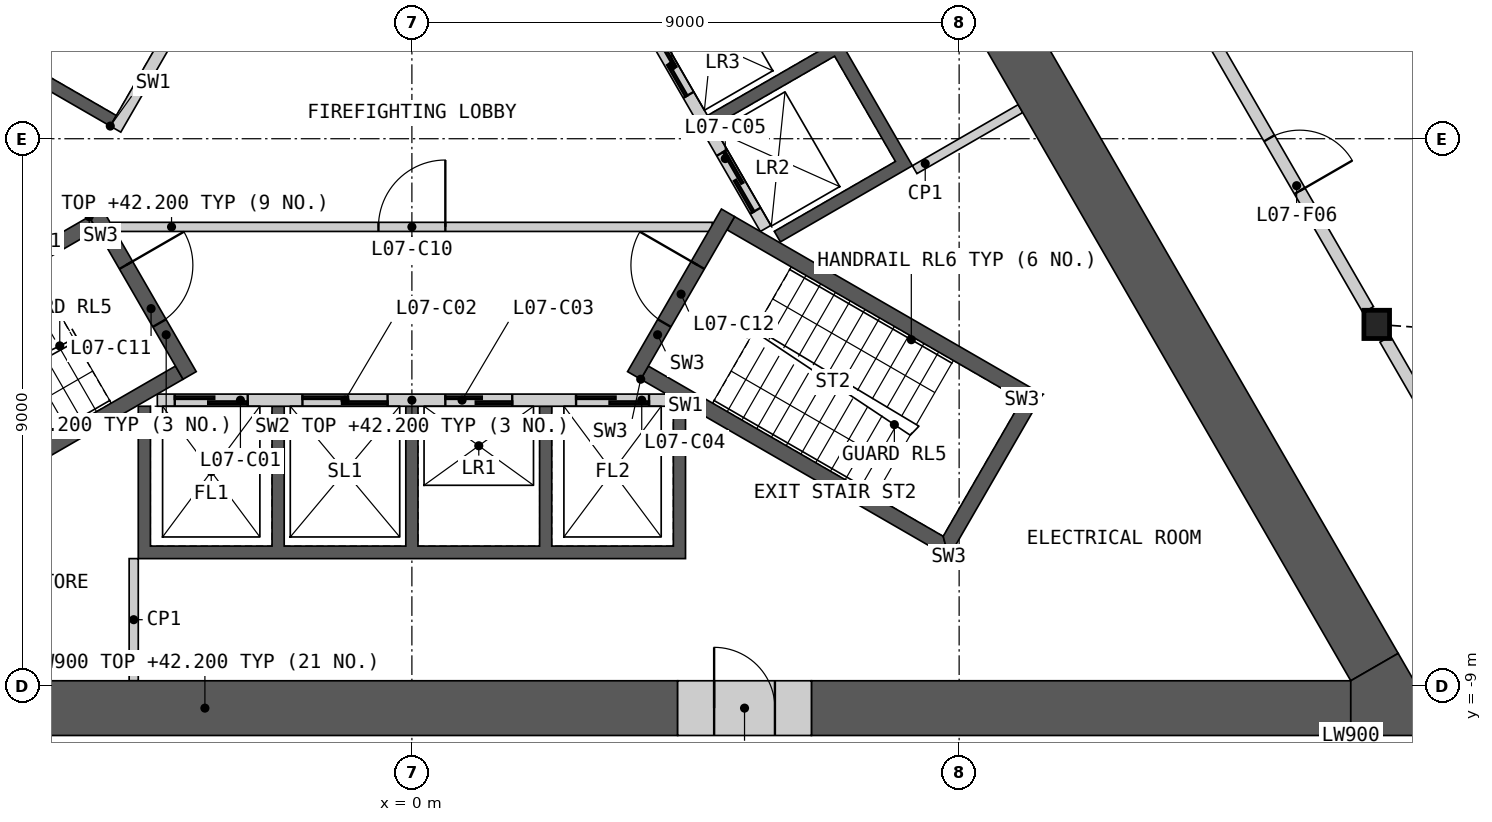
"""IFC4 building model, lengths in metres.
Left out: names, types, materials, properties, quantities, classifications, styles, units other than length and angle.
Written with IfcOpenShell. Run it as: python <this file> out.ifc"""

import sys

from ifc_helpers import new_model, si_unit, direction, frame, frame_2d, origin, origin_2d, place, context, subcontext, project, spatial, polyline, rectangle, i_section, outline, extrude, element, fill, save


model = new_model("IFC4")
c1 = context("Model", 3, precision=1e-05, world=origin(), true_north=direction((0.0, 1.0)))
c2 = subcontext(c1, "Body", "Model", "MODEL_VIEW")
j1 = project(units=[si_unit("LENGTHUNIT", "METRE"), si_unit("PLANEANGLEUNIT", "RADIAN")], contexts=[c1])
p1 = place(None, origin())
s1 = spatial("IfcSite", under=j1, at=p1, CompositionType="ELEMENT")
p2 = place(p1, origin())
s2 = spatial("IfcBuilding", under=s1, at=p2, CompositionType="ELEMENT")
p3 = place(p2, frame((0.0, 0.0, 38.4)))
s3 = spatial("IfcBuildingStorey", under=s2, at=p3, CompositionType="ELEMENT", Elevation=38.4)
p4 = place(p3, frame((15.868, -3.054, 0.0), z_axis=(0.0, 0.0, 1.0), x_axis=(1.0, 0.0, 0.0)))
e1 = element("IfcColumn", 1, at=p4, inside=s3, PredefinedType="COLUMN", context=c2, shape_type="SweptSolid", body=[
    extrude(i_section(OverallWidth=0.421, OverallDepth=0.465, WebThickness=0.045, FlangeThickness=0.072, at=origin_2d()), origin(), (0.0, 0.0, 1.0), 4.2),
])
p5 = place(p3, origin())
e2 = element("IfcWall", 2, at=p5, inside=s3, PredefinedType="SHEAR", context=c2, shape_type="SweptSolid", body=[
    extrude(outline(polyline([(4.5, -4.4), (4.5, -6.906), (-4.5, -6.906), (-4.5, -4.4), (-4.3, -4.4), (-4.3, -6.7), (-2.3, -6.7), (-2.3, -4.4), (-2.1, -4.4), (-2.1, -6.7), (-0.1, -6.7), (-0.1, -4.4), (0.1, -4.4), (0.1, -6.7), (2.1, -6.7), (2.1, -4.4), (2.3, -4.4), (2.3, -6.7), (4.3, -6.7), (4.3, -4.4), (4.5, -4.4)])), origin(), (0.0, 0.0, 1.0), 3.8),
])
p6 = place(p3, frame((-4.187, -4.3, 0.0), z_axis=(0.0, 0.0, 1.0), x_axis=(1.0, 0.0, 0.0)))
e3 = element("IfcWall", 3, at=p6, inside=s3, PredefinedType="SOLIDWALL", context=c2, shape_type="SweptSolid", body=[
    extrude(rectangle(XDim=8.373, YDim=0.2, at=frame_2d((4.187, 0.0))), origin(), (0.0, 0.0, 1.0), 3.8),
])
p7 = place(p6, frame((0.287, 0.0, 0.0)))
e4 = element("IfcOpeningElement", 4, at=p7, cuts=e3, PredefinedType="OPENING", context=c2, shape_type="SweptSolid", body=[
    extrude(rectangle(XDim=1.2, YDim=2.1, at=frame_2d((0.6, 1.05))), frame((0.0, 0.11, 0.0), z_axis=(0.0, -1.0, 0.0), x_axis=(1.0, 0.0, 0.0)), (0.0, 0.0, 1.0), 0.22),
])
p8 = place(p6, frame((2.387, 0.0, 0.0)))
e5 = element("IfcOpeningElement", 5, at=p8, cuts=e3, PredefinedType="OPENING", context=c2, shape_type="SweptSolid", body=[
    extrude(rectangle(XDim=1.4, YDim=2.1, at=frame_2d((0.7, 1.05))), frame((0.0, 0.11, 0.0), z_axis=(0.0, -1.0, 0.0), x_axis=(1.0, 0.0, 0.0)), (0.0, 0.0, 1.0), 0.22),
])
p9 = place(p6, frame((4.737, 0.0, 0.0)))
e6 = element("IfcOpeningElement", 6, at=p9, cuts=e3, PredefinedType="OPENING", context=c2, shape_type="SweptSolid", body=[
    extrude(rectangle(XDim=1.1, YDim=2.1, at=frame_2d((0.55, 1.05))), frame((0.0, 0.11, 0.0), z_axis=(0.0, -1.0, 0.0), x_axis=(1.0, 0.0, 0.0)), (0.0, 0.0, 1.0), 0.22),
])
p10 = place(p6, frame((6.887, 0.0, 0.0)))
e7 = element("IfcOpeningElement", 7, at=p10, cuts=e3, PredefinedType="OPENING", context=c2, shape_type="SweptSolid", body=[
    extrude(rectangle(XDim=1.2, YDim=2.1, at=frame_2d((0.6, 1.05))), frame((0.0, 0.11, 0.0), z_axis=(0.0, -1.0, 0.0), x_axis=(1.0, 0.0, 0.0)), (0.0, 0.0, 1.0), 0.22),
])
p11 = place(p3, origin())
e8 = element("IfcWall", 8, at=p11, inside=s3, PredefinedType="SHEAR", context=c2, shape_type="SweptSolid", body=[
    extrude(outline(polyline([(2.66, 4.192), (4.831, 5.445), (8.231, -0.444), (6.061, -1.697), (5.96, -1.524), (7.952, -0.374), (6.952, 1.358), (4.96, 0.208), (4.861, 0.381), (6.852, 1.531), (5.852, 3.263), (3.861, 2.113), (3.76, 2.287), (5.752, 3.437), (4.752, 5.169), (2.76, 4.019), (2.66, 4.192)])), origin(), (0.0, 0.0, 1.0), 3.8),
])
p12 = place(p3, frame((5.817, -1.476, 0.0), z_axis=(0.0, 0.0, 1.0), x_axis=(-0.500002616675, 0.866023893041, 0.0)))
e9 = element("IfcWall", 9, at=p12, inside=s3, PredefinedType="SOLIDWALL", context=c2, shape_type="SweptSolid", body=[
    extrude(rectangle(XDim=8.373, YDim=0.2, at=frame_2d((4.187, 0.0))), origin(), (0.0, 0.0, 1.0), 3.8),
])
p13 = place(p12, frame((0.337, 0.0, 0.0)))
e10 = element("IfcOpeningElement", 10, at=p13, cuts=e9, PredefinedType="OPENING", context=c2, shape_type="SweptSolid", body=[
    extrude(rectangle(XDim=1.1, YDim=2.1, at=frame_2d((0.55, 1.05))), frame((0.0, 0.11, 0.0), z_axis=(0.0, -1.0, 0.0), x_axis=(1.0, 0.0, 0.0)), (0.0, 0.0, 1.0), 0.22),
])
p14 = place(p12, frame((2.537, 0.0, 0.0)))
e11 = element("IfcOpeningElement", 11, at=p14, cuts=e9, PredefinedType="OPENING", context=c2, shape_type="SweptSolid", body=[
    extrude(rectangle(XDim=1.1, YDim=2.1, at=frame_2d((0.55, 1.05))), frame((0.0, 0.11, 0.0), z_axis=(0.0, -1.0, 0.0), x_axis=(1.0, 0.0, 0.0)), (0.0, 0.0, 1.0), 0.22),
])
p15 = place(p12, frame((4.737, 0.0, 0.0)))
e12 = element("IfcOpeningElement", 12, at=p15, cuts=e9, PredefinedType="OPENING", context=c2, shape_type="SweptSolid", body=[
    extrude(rectangle(XDim=1.1, YDim=2.1, at=frame_2d((0.55, 1.05))), frame((0.0, 0.11, 0.0), z_axis=(0.0, -1.0, 0.0), x_axis=(1.0, 0.0, 0.0)), (0.0, 0.0, 1.0), 0.22),
])
p16 = place(p12, frame((7.037, 0.0, 0.0)))
e13 = element("IfcOpeningElement", 13, at=p16, cuts=e9, PredefinedType="OPENING", context=c2, shape_type="SweptSolid", body=[
    extrude(rectangle(XDim=0.9, YDim=2.1, at=frame_2d((0.45, 1.05))), frame((0.0, 0.11, 0.0), z_axis=(0.0, -1.0, 0.0), x_axis=(1.0, 0.0, 0.0)), (0.0, 0.0, 1.0), 0.22),
])
p17 = place(p3, origin())
e14 = element("IfcWall", 14, at=p17, inside=s3, PredefinedType="SHEAR", context=c2, shape_type="SweptSolid", body=[
    extrude(outline(polyline([(-4.96, 0.208), (-7.131, 1.461), (-3.731, 7.35), (-1.561, 6.097), (-1.66, 5.924), (-3.652, 7.074), (-5.752, 3.437), (-3.76, 2.287), (-3.861, 2.113), (-5.852, 3.263), (-6.852, 1.531), (-4.861, 0.381), (-4.96, 0.208)])), origin(), (0.0, 0.0, 1.0), 3.8),
])
p18 = place(p3, frame((-1.631, 5.776, 0.0), z_axis=(0.0, 0.0, 1.0), x_axis=(-0.499992876559, -0.866029516466, 0.0)))
e15 = element("IfcWall", 15, at=p18, inside=s3, PredefinedType="SOLIDWALL", context=c2, shape_type="SweptSolid", body=[
    extrude(rectangle(XDim=6.486, YDim=0.2, at=frame_2d((3.243, 0.0))), origin(), (0.0, 0.0, 1.0), 3.8),
])
p19 = place(p18, frame((1.537, 0.0, 0.0)))
e16 = element("IfcOpeningElement", 16, at=p19, cuts=e15, PredefinedType="OPENING", context=c2, shape_type="SweptSolid", body=[
    extrude(rectangle(XDim=0.9, YDim=2.1, at=frame_2d((0.45, 1.05))), frame((0.0, 0.11, 0.0), z_axis=(0.0, -1.0, 0.0), x_axis=(1.0, 0.0, 0.0)), (0.0, 0.0, 1.0), 0.22),
])
p20 = place(p3, frame((-4.941, -1.45, 0.0), z_axis=(0.0, 0.0, 1.0), x_axis=(1.0, 0.0, 0.0)))
e17 = element("IfcWall", 17, at=p20, inside=s3, PredefinedType="PARTITIONING", context=c2, shape_type="SweptSolid", body=[
    extrude(rectangle(XDim=9.882, YDim=0.15, at=frame_2d((4.941, 0.0))), origin(), (0.0, 0.0, 1.0), 3.8),
])
p21 = place(p20, frame((4.391, 0.0, 0.0)))
e18 = element("IfcOpeningElement", 18, at=p21, cuts=e17, PredefinedType="OPENING", context=c2, shape_type="SweptSolid", body=[
    extrude(rectangle(XDim=1.1, YDim=2.1, at=frame_2d((0.55, 1.05))), frame((0.0, 0.085, 0.0), z_axis=(0.0, -1.0, 0.0), x_axis=(1.0, 0.0, 0.0)), (0.0, 0.0, 1.0), 0.17),
])
p22 = place(p3, origin())
e19 = element("IfcWall", 19, at=p22, inside=s3, PredefinedType="SHEAR", context=c2, shape_type="SweptSolid", body=[
    extrude(outline(polyline([(-5.307, -1.281), (-10.374, -4.206), (-10.032, -4.298), (-5.182, -1.498), (-5.307, -1.281)])), origin(), (0.0, 0.0, 1.0), 3.8),
])
p23 = place(p3, origin())
e20 = element("IfcWall", 20, at=p23, inside=s3, PredefinedType="SHEAR", context=c2, shape_type="SweptSolid", body=[
    extrude(outline(polyline([(-8.738, -6.539), (-8.83, -6.881), (-3.763, -3.956), (-3.888, -3.739), (-8.738, -6.539)])), origin(), (0.0, 0.0, 1.0), 3.8),
])
p24 = place(p3, frame((-5.199, -1.219, 0.0), z_axis=(0.0, 0.0, 1.0), x_axis=(0.499982516597, -0.866035497597, 0.0)))
e21 = element("IfcWall", 21, at=p24, inside=s3, PredefinedType="SHEAR", context=c2, shape_type="SweptSolid", body=[
    extrude(rectangle(XDim=3.088, YDim=0.25, at=frame_2d((1.544, 0.0))), origin(), (0.0, 0.0, 1.0), 3.8),
])
p25 = place(p24, frame((0.994, 0.0, 0.0)))
e22 = element("IfcOpeningElement", 22, at=p25, cuts=e21, PredefinedType="OPENING", context=c2, shape_type="SweptSolid", body=[
    extrude(rectangle(XDim=1.1, YDim=2.1, at=frame_2d((0.55, 1.05))), frame((0.0, 0.135, 0.0), z_axis=(0.0, -1.0, 0.0), x_axis=(1.0, 0.0, 0.0)), (0.0, 0.0, 1.0), 0.27),
])
p26 = place(p3, origin())
e23 = element("IfcWall", 23, at=p26, inside=s3, PredefinedType="SHEAR", context=c2, shape_type="SweptSolid", body=[
    extrude(outline(polyline([(3.763, -3.956), (8.83, -6.881), (8.738, -6.539), (3.888, -3.739), (3.763, -3.956)])), origin(), (0.0, 0.0, 1.0), 3.8),
])
p27 = place(p3, origin())
e24 = element("IfcWall", 24, at=p27, inside=s3, PredefinedType="SHEAR", context=c2, shape_type="SweptSolid", body=[
    extrude(outline(polyline([(8.83, -6.881), (10.374, -4.206), (10.032, -4.298), (8.738, -6.539), (8.83, -6.881)])), origin(), (0.0, 0.0, 1.0), 3.8),
])
p28 = place(p3, origin())
e25 = element("IfcWall", 25, at=p28, inside=s3, PredefinedType="SHEAR", context=c2, shape_type="SweptSolid", body=[
    extrude(outline(polyline([(10.032, -4.298), (10.374, -4.206), (5.307, -1.281), (5.182, -1.498), (10.032, -4.298)])), origin(), (0.0, 0.0, 1.0), 3.8),
])
p29 = place(p3, frame((3.655, -3.893, 0.0), z_axis=(0.0, 0.0, 1.0), x_axis=(0.499982516597, 0.866035497597, 0.0)))
e26 = element("IfcWall", 26, at=p29, inside=s3, PredefinedType="SHEAR", context=c2, shape_type="SweptSolid", body=[
    extrude(rectangle(XDim=3.088, YDim=0.25, at=frame_2d((1.544, 0.0))), origin(), (0.0, 0.0, 1.0), 3.8),
])
p30 = place(p29, frame((0.994, 0.0, 0.0)))
e27 = element("IfcOpeningElement", 27, at=p30, cuts=e26, PredefinedType="OPENING", context=c2, shape_type="SweptSolid", body=[
    extrude(rectangle(XDim=1.1, YDim=2.1, at=frame_2d((0.55, 1.05))), frame((0.0, 0.135, 0.0), z_axis=(0.0, -1.0, 0.0), x_axis=(1.0, 0.0, 0.0)), (0.0, 0.0, 1.0), 0.27),
])
p31 = place(p3, frame((8.268, -0.509, 0.0), z_axis=(0.0, 0.0, 1.0), x_axis=(0.866035824272, 0.499981950752, 0.0)))
e28 = element("IfcWall", 28, at=p31, inside=s3, PredefinedType="PARTITIONING", context=c2, shape_type="SweptSolid", body=[
    extrude(rectangle(XDim=2.009, YDim=0.15, at=frame_2d((1.004, 0.0))), origin(), (0.0, 0.0, 1.0), 3.8),
])
p32 = place(p3, frame((-4.575, -6.906, 0.0), z_axis=(0.0, 0.0, 1.0), x_axis=(0.0, -1.0, 0.0)))
e29 = element("IfcWall", 29, at=p32, inside=s3, PredefinedType="PARTITIONING", context=c2, shape_type="SweptSolid", body=[
    extrude(rectangle(XDim=2.009, YDim=0.15, at=frame_2d((1.004, 0.0))), origin(), (0.0, 0.0, 1.0), 3.8),
])
p33 = place(p3, frame((-11.179, -9.365, 0.0), z_axis=(0.0, 0.0, 1.0), x_axis=(1.0, 0.0, 0.0)))
e30 = element("IfcWall", 30, at=p33, inside=s3, PredefinedType="SHEAR", context=c2, shape_type="SweptSolid", body=[
    extrude(rectangle(XDim=15.55, YDim=0.9, at=frame_2d((7.775, 0.0))), origin(), (0.0, 0.0, 1.0), 3.8),
])
p34 = place(p3, frame((6.571, -9.365, 0.0), z_axis=(0.0, 0.0, 1.0), x_axis=(1.0, 0.0, 0.0)))
e31 = element("IfcWall", 31, at=p34, inside=s3, PredefinedType="SHEAR", context=c2, shape_type="SweptSolid", body=[
    extrude(rectangle(XDim=8.871, YDim=0.9, at=frame_2d((4.435, 0.0))), origin(), (0.0, 0.0, 1.0), 3.8),
])
p35 = place(p3, frame((15.831, -8.69, 0.0), z_axis=(0.0, 0.0, 1.0), x_axis=(-0.499997452939, 0.866026874326, 0.0)))
e32 = element("IfcWall", 32, at=p35, inside=s3, PredefinedType="SHEAR", context=c2, shape_type="SweptSolid", body=[
    extrude(rectangle(XDim=13.141, YDim=0.9, at=frame_2d((6.571, 0.0))), origin(), (0.0, 0.0, 1.0), 3.8),
])
p36 = place(p3, origin())
e33 = element("IfcWall", 33, at=p36, inside=s3, PredefinedType="SHEAR", context=c2, shape_type="SweptSolid", body=[
    extrude(outline(polyline([(15.441, -9.815), (15.441, -8.915), (16.221, -8.465), (17.0, -9.815), (15.441, -9.815)])), origin(), (0.0, 0.0, 1.0), 3.8),
])
p37 = place(p3, frame((4.371, -9.365, 0.0), z_axis=(0.0, 0.0, 1.0), x_axis=(1.0, 0.0, 0.0)))
e34 = element("IfcWall", 34, at=p37, inside=s3, PredefinedType="SHEAR", context=c2, shape_type="SweptSolid", body=[
    extrude(rectangle(XDim=2.2, YDim=0.9, at=frame_2d((1.1, 0.0))), origin(), (0.0, 0.0, 1.0), 3.8),
])
p38 = place(p37, frame((0.6, 0.0, 0.0)))
e35 = element("IfcOpeningElement", 35, at=p38, cuts=e34, PredefinedType="OPENING", context=c2, shape_type="SweptSolid", body=[
    extrude(rectangle(XDim=1.0, YDim=2.1, at=frame_2d((0.5, 1.05))), frame((0.0, 0.46, 0.0), z_axis=(0.0, -1.0, 0.0), x_axis=(1.0, 0.0, 0.0)), (0.0, 0.0, 1.0), 0.92),
])
p39 = place(p3, frame((10.719, 5.865, 0.0), z_axis=(0.0, 0.0, 1.0), x_axis=(0.49999175339, -0.866030164915, 0.0)))
e36 = element("IfcWall", 36, at=p39, inside=s3, PredefinedType="PARTITIONING", context=c2, shape_type="SweptSolid", body=[
    extrude(rectangle(XDim=10.019, YDim=0.2, at=frame_2d((5.009, 0.0))), origin(), (0.0, 0.0, 1.0), 3.8),
])
p40 = place(p39, frame((6.764, 0.0, 0.0)))
e37 = element("IfcOpeningElement", 37, at=p40, cuts=e36, PredefinedType="OPENING", context=c2, shape_type="SweptSolid", body=[
    extrude(rectangle(XDim=1.0, YDim=2.1, at=frame_2d((0.5, 1.05))), frame((0.0, 0.11, 0.0), z_axis=(0.0, -1.0, 0.0), x_axis=(1.0, 0.0, 0.0)), (0.0, 0.0, 1.0), 0.22),
])
p41 = place(p3, frame((16.008, -3.296, 0.0), z_axis=(0.0, 0.0, 1.0), x_axis=(0.499984737558, -0.86603421538, 0.0)))
e38 = element("IfcWall", 38, at=p41, inside=s3, PredefinedType="PARTITIONING", context=c2, shape_type="SweptSolid", body=[
    extrude(rectangle(XDim=6.473, YDim=0.2, at=frame_2d((3.236, 0.0))), origin(), (0.0, 0.0, 1.0), 3.8),
])
p42 = place(p41, frame((4.512, 0.0, 0.0)))
e39 = element("IfcOpeningElement", 39, at=p42, cuts=e38, PredefinedType="OPENING", context=c2, shape_type="SweptSolid", body=[
    extrude(rectangle(XDim=1.0, YDim=2.1, at=frame_2d((0.5, 1.05))), frame((0.0, 0.11, 0.0), z_axis=(0.0, -1.0, 0.0), x_axis=(1.0, 0.0, 0.0)), (0.0, 0.0, 1.0), 0.22),
])
p43 = place(p7, origin())
e40 = element("IfcDoor", 40, at=p43, inside=s3, OperationType="SLIDING_TO_LEFT", PredefinedType="DOOR", context=c2, shape_type="SweptSolid", body=[
    extrude(rectangle(XDim=1.2, YDim=2.1, at=frame_2d((0.6, 1.05))), frame((0.0, 0.025, 0.0), z_axis=(0.0, -1.0, 0.0), x_axis=(1.0, 0.0, 0.0)), (0.0, 0.0, 1.0), 0.05),
])
fill(e4, e40)
p44 = place(p8, origin())
e41 = element("IfcDoor", 41, at=p44, inside=s3, OperationType="SLIDING_TO_LEFT", PredefinedType="DOOR", context=c2, shape_type="SweptSolid", body=[
    extrude(rectangle(XDim=1.4, YDim=2.1, at=frame_2d((0.7, 1.05))), frame((0.0, 0.025, 0.0), z_axis=(0.0, -1.0, 0.0), x_axis=(1.0, 0.0, 0.0)), (0.0, 0.0, 1.0), 0.05),
])
fill(e5, e41)
p45 = place(p9, origin())
e42 = element("IfcDoor", 42, at=p45, inside=s3, OperationType="SLIDING_TO_LEFT", PredefinedType="DOOR", context=c2, shape_type="SweptSolid", body=[
    extrude(rectangle(XDim=1.1, YDim=2.1, at=frame_2d((0.55, 1.05))), frame((0.0, 0.025, 0.0), z_axis=(0.0, -1.0, 0.0), x_axis=(1.0, 0.0, 0.0)), (0.0, 0.0, 1.0), 0.05),
])
fill(e6, e42)
p46 = place(p10, origin())
e43 = element("IfcDoor", 43, at=p46, inside=s3, OperationType="SLIDING_TO_LEFT", PredefinedType="DOOR", context=c2, shape_type="SweptSolid", body=[
    extrude(rectangle(XDim=1.2, YDim=2.1, at=frame_2d((0.6, 1.05))), frame((0.0, 0.025, 0.0), z_axis=(0.0, -1.0, 0.0), x_axis=(1.0, 0.0, 0.0)), (0.0, 0.0, 1.0), 0.05),
])
fill(e7, e43)
p47 = place(p13, origin())
e44 = element("IfcDoor", 44, at=p47, inside=s3, OperationType="SLIDING_TO_LEFT", PredefinedType="DOOR", context=c2, shape_type="SweptSolid", body=[
    extrude(rectangle(XDim=1.1, YDim=2.1, at=frame_2d((0.55, 1.05))), frame((0.0, 0.025, 0.0), z_axis=(0.0, -1.0, 0.0), x_axis=(1.0, 0.0, 0.0)), (0.0, 0.0, 1.0), 0.05),
])
fill(e10, e44)
p48 = place(p14, origin())
e45 = element("IfcDoor", 45, at=p48, inside=s3, OperationType="SLIDING_TO_LEFT", PredefinedType="DOOR", context=c2, shape_type="SweptSolid", body=[
    extrude(rectangle(XDim=1.1, YDim=2.1, at=frame_2d((0.55, 1.05))), frame((0.0, 0.025, 0.0), z_axis=(0.0, -1.0, 0.0), x_axis=(1.0, 0.0, 0.0)), (0.0, 0.0, 1.0), 0.05),
])
fill(e11, e45)
p49 = place(p21, origin())
e46 = element("IfcDoor", 46, at=p49, inside=s3, OperationType="SINGLE_SWING_RIGHT", PredefinedType="DOOR", context=c2, shape_type="SweptSolid", body=[
    extrude(rectangle(XDim=1.1, YDim=2.1, at=frame_2d((0.55, 1.05))), frame((0.0, 0.025, 0.0), z_axis=(0.0, -1.0, 0.0), x_axis=(1.0, 0.0, 0.0)), (0.0, 0.0, 1.0), 0.05),
])
fill(e18, e46)
p50 = place(p25, origin())
e47 = element("IfcDoor", 47, at=p50, inside=s3, OperationType="SINGLE_SWING_LEFT", PredefinedType="DOOR", context=c2, shape_type="SweptSolid", body=[
    extrude(rectangle(XDim=1.1, YDim=2.1, at=frame_2d((0.55, 1.05))), frame((0.0, 0.025, 0.0), z_axis=(0.0, -1.0, 0.0), x_axis=(1.0, 0.0, 0.0)), (0.0, 0.0, 1.0), 0.05),
])
fill(e22, e47)
p51 = place(p30, origin())
e48 = element("IfcDoor", 48, at=p51, inside=s3, OperationType="SINGLE_SWING_RIGHT", PredefinedType="DOOR", context=c2, shape_type="SweptSolid", body=[
    extrude(rectangle(XDim=1.1, YDim=2.1, at=frame_2d((0.55, 1.05))), frame((0.0, 0.025, 0.0), z_axis=(0.0, -1.0, 0.0), x_axis=(1.0, 0.0, 0.0)), (0.0, 0.0, 1.0), 0.05),
])
fill(e27, e48)
p52 = place(p38, origin())
e49 = element("IfcDoor", 49, at=p52, inside=s3, OperationType="SINGLE_SWING_LEFT", PredefinedType="DOOR", context=c2, shape_type="SweptSolid", body=[
    extrude(rectangle(XDim=1.0, YDim=2.1, at=frame_2d((0.5, 1.05))), frame((0.0, 0.205, 0.0), z_axis=(0.0, -1.0, 0.0), x_axis=(1.0, 0.0, 0.0)), (0.0, 0.0, 1.0), 0.05),
])
fill(e35, e49)
p53 = place(p40, origin())
e50 = element("IfcDoor", 50, at=p53, inside=s3, OperationType="SINGLE_SWING_RIGHT", PredefinedType="DOOR", context=c2, shape_type="SweptSolid", body=[
    extrude(rectangle(XDim=1.0, YDim=2.1, at=frame_2d((0.5, 1.05))), frame((0.0, 0.025, 0.0), z_axis=(0.0, -1.0, 0.0), x_axis=(1.0, 0.0, 0.0)), (0.0, 0.0, 1.0), 0.05),
])
fill(e37, e50)
save(model, sys.argv[1])
